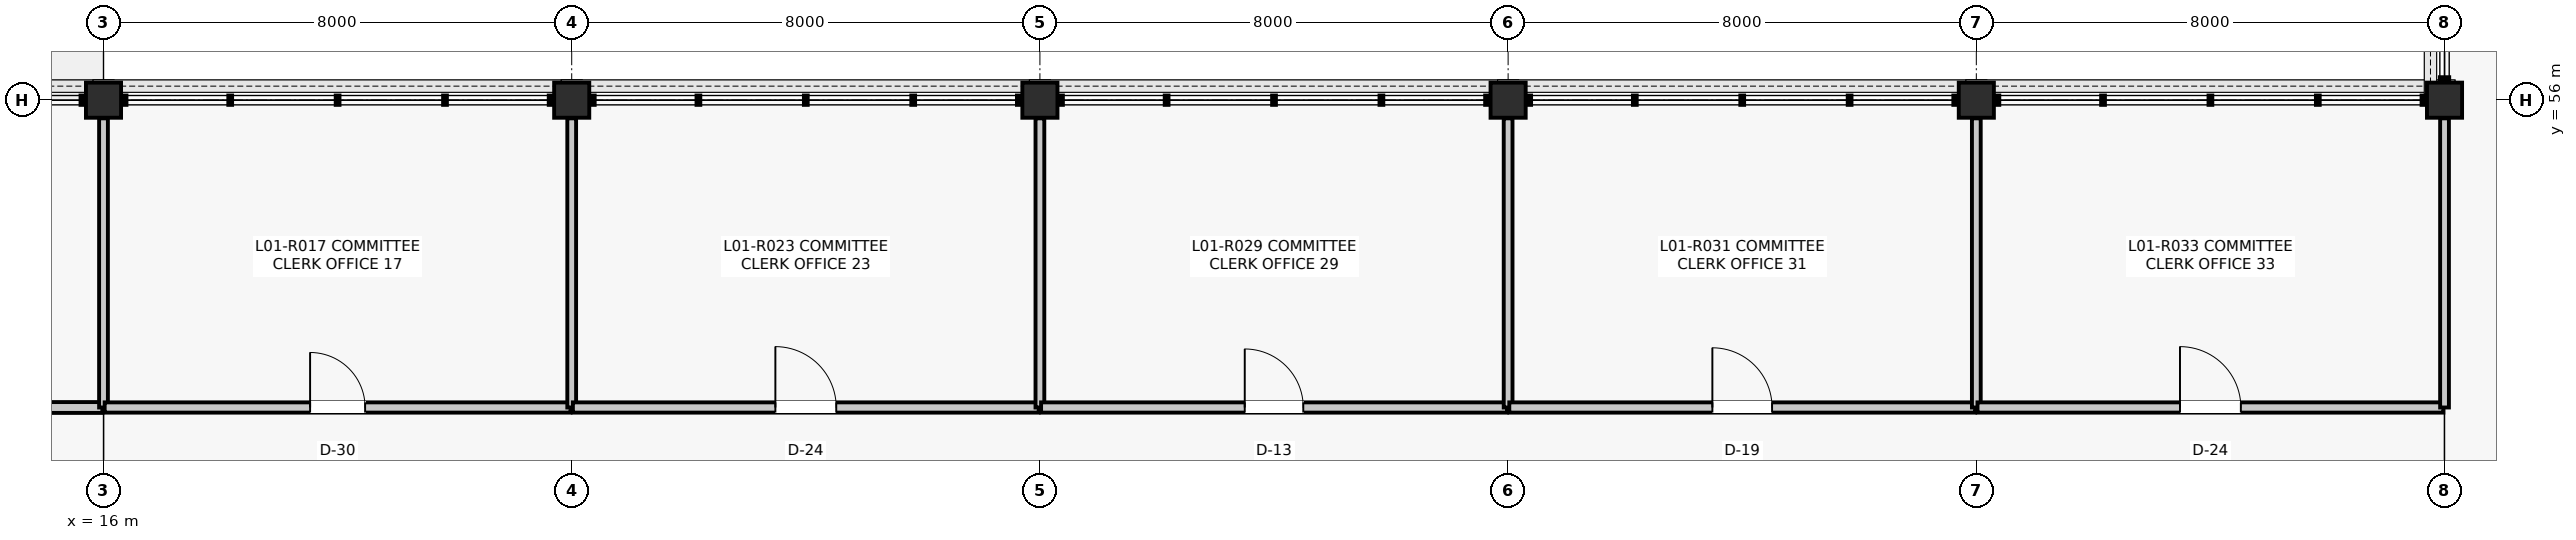
"""IFC4 building model, lengths in metres.
Left out: names, types, materials, properties, quantities, classifications, styles, units other than length and angle.
Written with IfcOpenShell. Run it as: python <this file> out.ifc"""

import sys

from ifc_helpers import new_model, si_unit, direction, frame, frame_2d, origin, origin_2d, place, context, subcontext, project, spatial, rectangle, extrude, element, fill, save


model = new_model("IFC4")
c1 = context("Model", 3, precision=1e-05, world=origin(), true_north=direction((0.0, 1.0)))
c2 = subcontext(c1, "Body", "Model", "MODEL_VIEW")
j1 = project(units=[si_unit("LENGTHUNIT", "METRE"), si_unit("PLANEANGLEUNIT", "RADIAN")], contexts=[c1])
p1 = place(None, origin())
s1 = spatial("IfcSite", under=j1, at=p1, CompositionType="ELEMENT")
p2 = place(p1, origin())
s2 = spatial("IfcBuilding", under=s1, at=p2, CompositionType="ELEMENT")
p3 = place(p2, frame((0.0, 0.0, 5.28)))
s3 = spatial("IfcBuildingStorey", under=s2, at=p3, CompositionType="ELEMENT", Elevation=5.28)
for number, where, z_axis, x_axis in (
    (1, (16.0, 56.0, 0.0), (0.0, 0.0, 1.0), (1.0, 0.0, 0.0)),
    (2, (24.0, 56.0, 0.0), (0.0, 0.0, 1.0), (1.0, 0.0, 0.0)),
    (3, (32.0, 56.0, 0.0), (0.0, 0.0, 1.0), (1.0, 0.0, 0.0)),
    (4, (40.0, 56.0, 0.0), (0.0, 0.0, 1.0), (1.0, 0.0, 0.0)),
    (5, (48.0, 56.0, 0.0), (0.0, 0.0, 1.0), (1.0, 0.0, 0.0)),
    (6, (56.0, 56.0, 0.0), (0.0, 0.0, 1.0), (1.0, 0.0, 0.0)),
):
    element("IfcColumn", number, at=place(p3, frame(where, z_axis=z_axis, x_axis=x_axis)), inside=s3, PredefinedType="COLUMN", context=c2, shape_type="SweptSolid", body=[
        extrude(rectangle(XDim=0.6, YDim=0.6, at=origin_2d()), origin(), (0.0, 0.0, 1.0), 4.62),
    ])
p4 = place(p3, frame((8.02, 50.75, 0.0), z_axis=(0.0, 0.0, 1.0), x_axis=(1.0, 0.0, 0.0)))
e7 = element("IfcWall", 7, at=p4, inside=s3, PredefinedType="PARTITIONING", context=c2, shape_type="SweptSolid", body=[
    extrude(rectangle(XDim=7.96, YDim=0.185, at=frame_2d((3.98, 0.0))), origin(), (0.0, 0.0, 1.0), 3.787),
])
p5 = place(p4, frame((3.5, 0.0, 0.0)))
e8 = element("IfcOpeningElement", 8, at=p5, cuts=e7, PredefinedType="OPENING", context=c2, shape_type="SweptSolid", body=[
    extrude(rectangle(XDim=0.96, YDim=2.14, at=frame_2d((0.48, 1.07))), frame((0.0, 0.103, 0.0), z_axis=(0.0, -1.0, 0.0), x_axis=(1.0, 0.0, 0.0)), (0.0, 0.0, 1.0), 0.205),
])
p6 = place(p3, frame((16.0, 50.75, 0.0), z_axis=(0.0, 0.0, 1.0), x_axis=(0.0, 1.0, 0.0)))
e9 = element("IfcWall", 9, at=p6, inside=s3, PredefinedType="PARTITIONING", context=c2, shape_type="SweptSolid", body=[
    extrude(rectangle(XDim=4.94, YDim=0.15, at=frame_2d((2.47, 0.0))), origin(), (0.0, 0.0, 1.0), 3.787),
])
p7 = place(p3, frame((16.02, 50.75, 0.0), z_axis=(0.0, 0.0, 1.0), x_axis=(1.0, 0.0, 0.0)))
e10 = element("IfcWall", 10, at=p7, inside=s3, PredefinedType="PARTITIONING", context=c2, shape_type="SweptSolid", body=[
    extrude(rectangle(XDim=7.96, YDim=0.175, at=frame_2d((3.98, 0.0))), origin(), (0.0, 0.0, 1.0), 3.787),
])
p8 = place(p7, frame((3.51, 0.0, 0.0)))
e11 = element("IfcOpeningElement", 11, at=p8, cuts=e10, PredefinedType="OPENING", context=c2, shape_type="SweptSolid", body=[
    extrude(rectangle(XDim=0.94, YDim=2.12, at=frame_2d((0.47, 1.06))), frame((0.0, 0.097, 0.0), z_axis=(0.0, -1.0, 0.0), x_axis=(1.0, 0.0, 0.0)), (0.0, 0.0, 1.0), 0.195),
])
p9 = place(p3, frame((24.0, 50.75, 0.0), z_axis=(0.0, 0.0, 1.0), x_axis=(0.0, 1.0, 0.0)))
e12 = element("IfcWall", 12, at=p9, inside=s3, PredefinedType="PARTITIONING", context=c2, shape_type="SweptSolid", body=[
    extrude(rectangle(XDim=4.94, YDim=0.15, at=frame_2d((2.47, 0.0))), origin(), (0.0, 0.0, 1.0), 3.857),
])
p10 = place(p3, frame((24.02, 50.75, 0.0), z_axis=(0.0, 0.0, 1.0), x_axis=(1.0, 0.0, 0.0)))
e13 = element("IfcWall", 13, at=p10, inside=s3, PredefinedType="PARTITIONING", context=c2, shape_type="SweptSolid", body=[
    extrude(rectangle(XDim=7.96, YDim=0.175, at=frame_2d((3.98, 0.0))), origin(), (0.0, 0.0, 1.0), 3.781),
])
p11 = place(p10, frame((3.46, 0.0, 0.0)))
e14 = element("IfcOpeningElement", 14, at=p11, cuts=e13, PredefinedType="OPENING", context=c2, shape_type="SweptSolid", body=[
    extrude(rectangle(XDim=1.04, YDim=2.18, at=frame_2d((0.52, 1.09))), frame((0.0, 0.097, 0.0), z_axis=(0.0, -1.0, 0.0), x_axis=(1.0, 0.0, 0.0)), (0.0, 0.0, 1.0), 0.195),
])
p12 = place(p3, frame((32.0, 50.75, 0.0), z_axis=(0.0, 0.0, 1.0), x_axis=(0.0, 1.0, 0.0)))
e15 = element("IfcWall", 15, at=p12, inside=s3, PredefinedType="PARTITIONING", context=c2, shape_type="SweptSolid", body=[
    extrude(rectangle(XDim=4.94, YDim=0.15, at=frame_2d((2.47, 0.0))), origin(), (0.0, 0.0, 1.0), 3.781),
])
p13 = place(p3, frame((32.02, 50.75, 0.0), z_axis=(0.0, 0.0, 1.0), x_axis=(1.0, 0.0, 0.0)))
e16 = element("IfcWall", 16, at=p13, inside=s3, PredefinedType="PARTITIONING", context=c2, shape_type="SweptSolid", body=[
    extrude(rectangle(XDim=7.96, YDim=0.175, at=frame_2d((3.98, 0.0))), origin(), (0.0, 0.0, 1.0), 3.781),
])
p14 = place(p13, frame((3.48, 0.0, 0.0)))
e17 = element("IfcOpeningElement", 17, at=p14, cuts=e16, PredefinedType="OPENING", context=c2, shape_type="SweptSolid", body=[
    extrude(rectangle(XDim=1.0, YDim=2.15, at=frame_2d((0.5, 1.075))), frame((0.0, 0.097, 0.0), z_axis=(0.0, -1.0, 0.0), x_axis=(1.0, 0.0, 0.0)), (0.0, 0.0, 1.0), 0.195),
])
p15 = place(p3, frame((40.0, 50.75, 0.0), z_axis=(0.0, 0.0, 1.0), x_axis=(0.0, 1.0, 0.0)))
e18 = element("IfcWall", 18, at=p15, inside=s3, PredefinedType="PARTITIONING", context=c2, shape_type="SweptSolid", body=[
    extrude(rectangle(XDim=4.94, YDim=0.15, at=frame_2d((2.47, 0.0))), origin(), (0.0, 0.0, 1.0), 3.851),
])
p16 = place(p3, frame((40.02, 50.75, 0.0), z_axis=(0.0, 0.0, 1.0), x_axis=(1.0, 0.0, 0.0)))
e19 = element("IfcWall", 19, at=p16, inside=s3, PredefinedType="PARTITIONING", context=c2, shape_type="SweptSolid", body=[
    extrude(rectangle(XDim=7.96, YDim=0.175, at=frame_2d((3.98, 0.0))), origin(), (0.0, 0.0, 1.0), 3.787),
])
p17 = place(p16, frame((3.47, 0.0, 0.0)))
e20 = element("IfcOpeningElement", 20, at=p17, cuts=e19, PredefinedType="OPENING", context=c2, shape_type="SweptSolid", body=[
    extrude(rectangle(XDim=1.02, YDim=2.2, at=frame_2d((0.51, 1.1))), frame((0.0, 0.097, 0.0), z_axis=(0.0, -1.0, 0.0), x_axis=(1.0, 0.0, 0.0)), (0.0, 0.0, 1.0), 0.195),
])
p18 = place(p3, frame((48.0, 50.75, 0.0), z_axis=(0.0, 0.0, 1.0), x_axis=(0.0, 1.0, 0.0)))
e21 = element("IfcWall", 21, at=p18, inside=s3, PredefinedType="PARTITIONING", context=c2, shape_type="SweptSolid", body=[
    extrude(rectangle(XDim=4.94, YDim=0.15, at=frame_2d((2.47, 0.0))), origin(), (0.0, 0.0, 1.0), 3.787),
])
p19 = place(p3, frame((48.02, 50.75, 0.0), z_axis=(0.0, 0.0, 1.0), x_axis=(1.0, 0.0, 0.0)))
e22 = element("IfcWall", 22, at=p19, inside=s3, PredefinedType="PARTITIONING", context=c2, shape_type="SweptSolid", body=[
    extrude(rectangle(XDim=7.96, YDim=0.175, at=frame_2d((3.98, 0.0))), origin(), (0.0, 0.0, 1.0), 3.787),
])
p20 = place(p19, frame((3.46, 0.0, 0.0)))
e23 = element("IfcOpeningElement", 23, at=p20, cuts=e22, PredefinedType="OPENING", context=c2, shape_type="SweptSolid", body=[
    extrude(rectangle(XDim=1.04, YDim=2.18, at=frame_2d((0.52, 1.09))), frame((0.0, 0.097, 0.0), z_axis=(0.0, -1.0, 0.0), x_axis=(1.0, 0.0, 0.0)), (0.0, 0.0, 1.0), 0.195),
])
p21 = place(p3, frame((56.0, 50.75, 0.0), z_axis=(0.0, 0.0, 1.0), x_axis=(0.0, 1.0, 0.0)))
e24 = element("IfcWall", 24, at=p21, inside=s3, PredefinedType="PARTITIONING", context=c2, shape_type="SweptSolid", body=[
    extrude(rectangle(XDim=4.94, YDim=0.15, at=frame_2d((2.47, 0.0))), origin(), (0.0, 0.0, 1.0), 3.857),
])
p22 = place(p8, origin())
e25 = element("IfcDoor", 25, at=p22, inside=s3, OperationType="SINGLE_SWING_LEFT", PredefinedType="DOOR", context=c2, shape_type="SweptSolid", body=[
    extrude(rectangle(XDim=0.94, YDim=2.12, at=frame_2d((0.47, 1.06))), frame((0.0, 0.025, 0.0), z_axis=(0.0, -1.0, 0.0), x_axis=(1.0, 0.0, 0.0)), (0.0, 0.0, 1.0), 0.05),
])
fill(e11, e25)
p23 = place(p11, origin())
e26 = element("IfcDoor", 26, at=p23, inside=s3, OperationType="SINGLE_SWING_LEFT", PredefinedType="DOOR", context=c2, shape_type="SweptSolid", body=[
    extrude(rectangle(XDim=1.04, YDim=2.18, at=frame_2d((0.52, 1.09))), frame((0.0, 0.025, 0.0), z_axis=(0.0, -1.0, 0.0), x_axis=(1.0, 0.0, 0.0)), (0.0, 0.0, 1.0), 0.05),
])
fill(e14, e26)
p24 = place(p14, origin())
e27 = element("IfcDoor", 27, at=p24, inside=s3, OperationType="SINGLE_SWING_LEFT", PredefinedType="DOOR", context=c2, shape_type="SweptSolid", body=[
    extrude(rectangle(XDim=1.0, YDim=2.15, at=frame_2d((0.5, 1.075))), frame((0.0, 0.025, 0.0), z_axis=(0.0, -1.0, 0.0), x_axis=(1.0, 0.0, 0.0)), (0.0, 0.0, 1.0), 0.05),
])
fill(e17, e27)
p25 = place(p17, origin())
e28 = element("IfcDoor", 28, at=p25, inside=s3, OperationType="SINGLE_SWING_LEFT", PredefinedType="DOOR", context=c2, shape_type="SweptSolid", body=[
    extrude(rectangle(XDim=1.02, YDim=2.2, at=frame_2d((0.51, 1.1))), frame((0.0, 0.025, 0.0), z_axis=(0.0, -1.0, 0.0), x_axis=(1.0, 0.0, 0.0)), (0.0, 0.0, 1.0), 0.05),
])
fill(e20, e28)
p26 = place(p20, origin())
e29 = element("IfcDoor", 29, at=p26, inside=s3, OperationType="SINGLE_SWING_LEFT", PredefinedType="DOOR", context=c2, shape_type="SweptSolid", body=[
    extrude(rectangle(XDim=1.04, YDim=2.18, at=frame_2d((0.52, 1.09))), frame((0.0, 0.025, 0.0), z_axis=(0.0, -1.0, 0.0), x_axis=(1.0, 0.0, 0.0)), (0.0, 0.0, 1.0), 0.05),
])
fill(e23, e29)
save(model, sys.argv[1])
